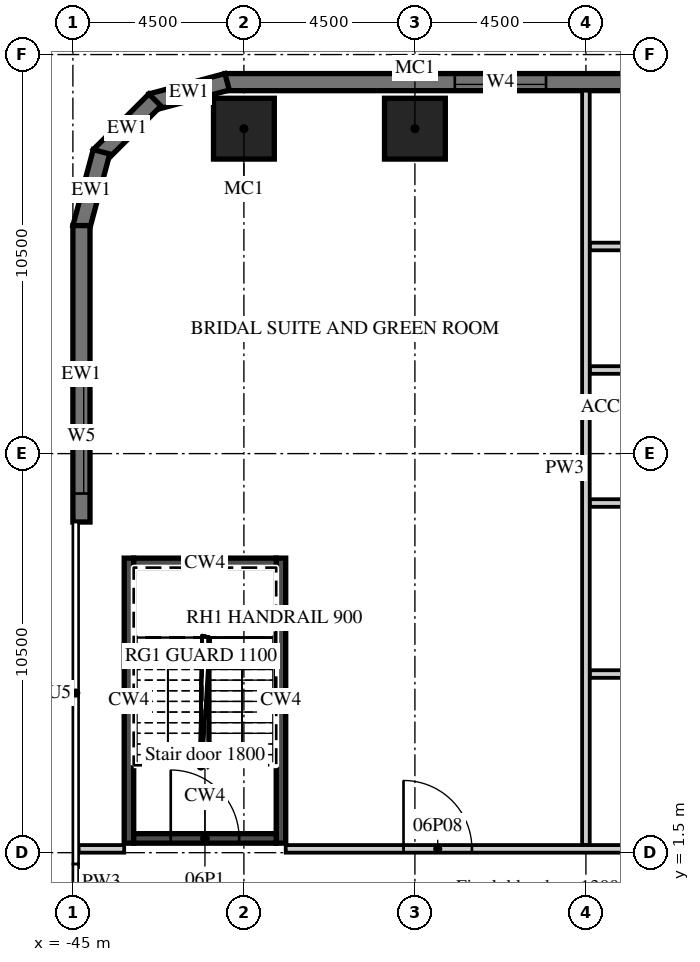
"""IFC4 building model, lengths in metres.
Left out: names, types, materials, properties, quantities, classifications, styles, units other than length and angle.
Written with IfcOpenShell. Run it as: python <this file> out.ifc"""

import sys

from ifc_helpers import new_model, si_unit, direction, frame, frame_2d, origin, origin_2d, place, context, subcontext, project, spatial, polyline, rectangle, outline, extrude, element, fill, save


model = new_model("IFC4")
c1 = context("Model", 3, precision=1e-05, world=origin(), true_north=direction((0.0, 1.0)))
c2 = subcontext(c1, "Body", "Model", "MODEL_VIEW")
j1 = project(units=[si_unit("LENGTHUNIT", "METRE"), si_unit("PLANEANGLEUNIT", "RADIAN")], contexts=[c1])
p1 = place(None, origin())
s1 = spatial("IfcSite", under=j1, at=p1, CompositionType="ELEMENT")
p2 = place(p1, origin())
s2 = spatial("IfcBuilding", under=s1, at=p2, CompositionType="ELEMENT")
p3 = place(p2, frame((0.0, 0.0, 38.0)))
s3 = spatial("IfcBuildingStorey", under=s2, at=p3, CompositionType="ELEMENT", Elevation=38.0)
for number, where, z_axis, x_axis in (
    (1, (-40.5, 20.55, 0.0), (0.0, 0.0, 1.0), (1.0, 0.0, 0.0)),
    (2, (-36.0, 20.55, 0.0), (0.0, 0.0, 1.0), (1.0, 0.0, 0.0)),
):
    element("IfcColumn", number, at=place(p3, frame(where, z_axis=z_axis, x_axis=x_axis)), inside=s3, PredefinedType="COLUMN", context=c2, shape_type="SweptSolid", body=[
        extrude(rectangle(XDim=1.6, YDim=1.6, at=origin_2d()), origin(), (0.0, 0.0, 1.0), 8.7),
    ])
p4 = place(p3, frame((13.5, 21.775, 0.0), z_axis=(0.0, 0.0, 1.0), x_axis=(-1.0, 0.0, 0.0)))
e3 = element("IfcWall", 3, at=p4, inside=s3, PredefinedType="SOLIDWALL", context=c2, shape_type="SweptSolid", body=[
    extrude(rectangle(XDim=54.5, YDim=0.45, at=frame_2d((27.25, 0.0))), origin(), (0.0, 0.0, 1.0), 8.7),
])
p5 = place(p4, frame((1.05, 0.0, 0.9)))
e4 = element("IfcOpeningElement", 4, at=p5, cuts=e3, PredefinedType="OPENING", context=c2, shape_type="SweptSolid", body=[
    extrude(rectangle(XDim=2.4, YDim=1.8, at=frame_2d((1.2, 0.9))), frame((0.0, 0.235, 0.0), z_axis=(0.0, -1.0, 0.0), x_axis=(1.0, 0.0, 0.0)), (0.0, 0.0, 1.0), 0.47),
])
p6 = place(p4, frame((5.55, 0.0, 0.9)))
e5 = element("IfcOpeningElement", 5, at=p6, cuts=e3, PredefinedType="OPENING", context=c2, shape_type="SweptSolid", body=[
    extrude(rectangle(XDim=2.4, YDim=1.8, at=frame_2d((1.2, 0.9))), frame((0.0, 0.235, 0.0), z_axis=(0.0, -1.0, 0.0), x_axis=(1.0, 0.0, 0.0)), (0.0, 0.0, 1.0), 0.47),
])
p7 = place(p4, frame((10.05, 0.0, 0.9)))
e6 = element("IfcOpeningElement", 6, at=p7, cuts=e3, PredefinedType="OPENING", context=c2, shape_type="SweptSolid", body=[
    extrude(rectangle(XDim=2.4, YDim=1.8, at=frame_2d((1.2, 0.9))), frame((0.0, 0.235, 0.0), z_axis=(0.0, -1.0, 0.0), x_axis=(1.0, 0.0, 0.0)), (0.0, 0.0, 1.0), 0.47),
])
p8 = place(p4, frame((14.55, 0.0, 0.9)))
e7 = element("IfcOpeningElement", 7, at=p8, cuts=e3, PredefinedType="OPENING", context=c2, shape_type="SweptSolid", body=[
    extrude(rectangle(XDim=2.4, YDim=1.8, at=frame_2d((1.2, 0.9))), frame((0.0, 0.235, 0.0), z_axis=(0.0, -1.0, 0.0), x_axis=(1.0, 0.0, 0.0)), (0.0, 0.0, 1.0), 0.47),
])
p9 = place(p4, frame((19.05, 0.0, 0.9)))
e8 = element("IfcOpeningElement", 8, at=p9, cuts=e3, PredefinedType="OPENING", context=c2, shape_type="SweptSolid", body=[
    extrude(rectangle(XDim=2.4, YDim=1.8, at=frame_2d((1.2, 0.9))), frame((0.0, 0.235, 0.0), z_axis=(0.0, -1.0, 0.0), x_axis=(1.0, 0.0, 0.0)), (0.0, 0.0, 1.0), 0.47),
])
p10 = place(p4, frame((23.55, 0.0, 0.9)))
e9 = element("IfcOpeningElement", 9, at=p10, cuts=e3, PredefinedType="OPENING", context=c2, shape_type="SweptSolid", body=[
    extrude(rectangle(XDim=2.4, YDim=1.8, at=frame_2d((1.2, 0.9))), frame((0.0, 0.235, 0.0), z_axis=(0.0, -1.0, 0.0), x_axis=(1.0, 0.0, 0.0)), (0.0, 0.0, 1.0), 0.47),
])
p11 = place(p4, frame((28.05, 0.0, 0.9)))
e10 = element("IfcOpeningElement", 10, at=p11, cuts=e3, PredefinedType="OPENING", context=c2, shape_type="SweptSolid", body=[
    extrude(rectangle(XDim=2.4, YDim=1.8, at=frame_2d((1.2, 0.9))), frame((0.0, 0.235, 0.0), z_axis=(0.0, -1.0, 0.0), x_axis=(1.0, 0.0, 0.0)), (0.0, 0.0, 1.0), 0.47),
])
p12 = place(p4, frame((32.55, 0.0, 0.9)))
e11 = element("IfcOpeningElement", 11, at=p12, cuts=e3, PredefinedType="OPENING", context=c2, shape_type="SweptSolid", body=[
    extrude(rectangle(XDim=2.4, YDim=1.8, at=frame_2d((1.2, 0.9))), frame((0.0, 0.235, 0.0), z_axis=(0.0, -1.0, 0.0), x_axis=(1.0, 0.0, 0.0)), (0.0, 0.0, 1.0), 0.47),
])
p13 = place(p4, frame((37.05, 0.0, 0.9)))
e12 = element("IfcOpeningElement", 12, at=p13, cuts=e3, PredefinedType="OPENING", context=c2, shape_type="SweptSolid", body=[
    extrude(rectangle(XDim=2.4, YDim=1.8, at=frame_2d((1.2, 0.9))), frame((0.0, 0.235, 0.0), z_axis=(0.0, -1.0, 0.0), x_axis=(1.0, 0.0, 0.0)), (0.0, 0.0, 1.0), 0.47),
])
p14 = place(p4, frame((41.55, 0.0, 0.9)))
e13 = element("IfcOpeningElement", 13, at=p14, cuts=e3, PredefinedType="OPENING", context=c2, shape_type="SweptSolid", body=[
    extrude(rectangle(XDim=2.4, YDim=1.8, at=frame_2d((1.2, 0.9))), frame((0.0, 0.235, 0.0), z_axis=(0.0, -1.0, 0.0), x_axis=(1.0, 0.0, 0.0)), (0.0, 0.0, 1.0), 0.47),
])
p15 = place(p4, frame((46.05, 0.0, 0.9)))
e14 = element("IfcOpeningElement", 14, at=p15, cuts=e3, PredefinedType="OPENING", context=c2, shape_type="SweptSolid", body=[
    extrude(rectangle(XDim=2.4, YDim=1.8, at=frame_2d((1.2, 0.9))), frame((0.0, 0.235, 0.0), z_axis=(0.0, -1.0, 0.0), x_axis=(1.0, 0.0, 0.0)), (0.0, 0.0, 1.0), 0.47),
])
p16 = place(p3, frame((-40.942, 21.783, 0.0), z_axis=(0.0, 0.0, 1.0), x_axis=(-0.965926999034, -0.25881466832, 0.0)))
e15 = element("IfcWall", 15, at=p16, inside=s3, PredefinedType="SOLIDWALL", context=c2, shape_type="SweptSolid", body=[
    extrude(outline(polyline([(0.0, -0.225), (2.071, -0.225), (1.95, 0.225), (0.121, 0.225), (0.0, -0.225)])), origin(), (0.0, 0.0, 1.0), 8.7),
])
p17 = place(p3, frame((-42.841, 21.305, 0.0), z_axis=(0.0, 0.0, 1.0), x_axis=(-0.707106781187, -0.707106781187, 0.0)))
e16 = element("IfcWall", 16, at=p17, inside=s3, PredefinedType="SOLIDWALL", context=c2, shape_type="SweptSolid", body=[
    extrude(outline(polyline([(0.0, -0.225), (2.071, -0.225), (1.95, 0.225), (0.121, 0.225), (0.0, -0.225)])), origin(), (0.0, 0.0, 1.0), 8.7),
])
p18 = place(p3, frame((-44.247, 19.942, 0.0), z_axis=(0.0, 0.0, 1.0), x_axis=(-0.25881466832, -0.965926999034, 0.0)))
e17 = element("IfcWall", 17, at=p18, inside=s3, PredefinedType="SOLIDWALL", context=c2, shape_type="SweptSolid", body=[
    extrude(outline(polyline([(-0.0, -0.225), (2.07, -0.225), (1.95, 0.225), (0.12, 0.225), (-0.0, -0.225)])), origin(), (0.0, 0.0, 1.0), 8.7),
])
p19 = place(p3, frame((-44.775, 18.0, 0.0), z_axis=(0.0, 0.0, 1.0), x_axis=(0.0, -1.0, 0.0)))
e18 = element("IfcWall", 18, at=p19, inside=s3, PredefinedType="SOLIDWALL", context=c2, shape_type="SweptSolid", body=[
    extrude(rectangle(XDim=7.8, YDim=0.45, at=frame_2d((3.9, 0.0))), origin(), (0.0, 0.0, 1.0), 8.7),
])
p20 = place(p19, frame((4.05, 0.0, 0.9)))
e19 = element("IfcOpeningElement", 19, at=p20, cuts=e18, PredefinedType="OPENING", context=c2, shape_type="SweptSolid", body=[
    extrude(rectangle(XDim=3.0, YDim=1.8, at=frame_2d((1.5, 0.9))), frame((0.0, 0.235, 0.0), z_axis=(0.0, -1.0, 0.0), x_axis=(1.0, 0.0, 0.0)), (0.0, 0.0, 1.0), 0.47),
])
for number, where, z_axis, x_axis in (
    (20, (-43.525, 1.75, 0.0), (0.0, 0.0, 1.0), (0.0, 1.0, 0.0)),
    (21, (-39.525, 1.75, 0.0), (0.0, 0.0, 1.0), (0.0, 1.0, 0.0)),
):
    element("IfcWall", number, at=place(p3, frame(where, z_axis=z_axis, x_axis=x_axis)), inside=s3, PredefinedType="SHEAR", context=c2, shape_type="SweptSolid", body=[
        extrude(rectangle(XDim=7.5, YDim=0.25, at=frame_2d((3.75, 0.0))), origin(), (0.0, 0.0, 1.0), 8.7),
    ])
p21 = place(p3, frame((-43.4, 9.125, 0.0), z_axis=(0.0, 0.0, 1.0), x_axis=(1.0, 0.0, 0.0)))
e22 = element("IfcWall", 22, at=p21, inside=s3, PredefinedType="SHEAR", context=c2, shape_type="SweptSolid", body=[
    extrude(rectangle(XDim=3.75, YDim=0.25, at=frame_2d((1.875, 0.0))), origin(), (0.0, 0.0, 1.0), 8.7),
])
p22 = place(p3, frame((-43.4, 1.875, 0.0), z_axis=(0.0, 0.0, 1.0), x_axis=(1.0, 0.0, 0.0)))
e23 = element("IfcWall", 23, at=p22, inside=s3, PredefinedType="SHEAR", context=c2, shape_type="SweptSolid", body=[
    extrude(rectangle(XDim=3.75, YDim=0.25, at=frame_2d((1.875, 0.0))), origin(), (0.0, 0.0, 1.0), 8.7),
])
p23 = place(p22, frame((0.975, 0.0, 0.0)))
e24 = element("IfcOpeningElement", 24, at=p23, cuts=e23, PredefinedType="OPENING", context=c2, shape_type="SweptSolid", body=[
    extrude(rectangle(XDim=1.8, YDim=2.1, at=frame_2d((0.9, 1.05))), frame((0.0, 0.135, 0.0), z_axis=(0.0, -1.0, 0.0), x_axis=(1.0, 0.0, 0.0)), (0.0, 0.0, 1.0), 0.27),
])
for number, where, z_axis, x_axis in (
    (25, (-31.4, 6.2, 0.0), (0.0, 0.0, 1.0), (1.0, 0.0, 0.0)),
    (26, (-31.4, 10.7, 0.0), (0.0, 0.0, 1.0), (1.0, 0.0, 0.0)),
    (27, (-31.4, 14.2, 0.0), (0.0, 0.0, 1.0), (1.0, 0.0, 0.0)),
):
    element("IfcWall", number, at=place(p3, frame(where, z_axis=z_axis, x_axis=x_axis)), inside=s3, PredefinedType="PARTITIONING", context=c2, shape_type="SweptSolid", body=[
        extrude(rectangle(XDim=5.05, YDim=0.2, at=frame_2d((2.525, 0.0))), origin(), (0.0, 0.0, 1.0), 8.7),
    ])
p24 = place(p3, frame((-31.4, 17.45, 0.0), z_axis=(0.0, 0.0, 1.0), x_axis=(1.0, 0.0, 0.0)))
e28 = element("IfcWall", 28, at=p24, inside=s3, PredefinedType="PARTITIONING", context=c2, shape_type="SweptSolid", body=[
    extrude(rectangle(XDim=8.8, YDim=0.2, at=frame_2d((4.4, 0.0))), origin(), (0.0, 0.0, 1.0), 8.7),
])
p25 = place(p24, frame((5.5, 0.0, 0.0)))
e29 = element("IfcOpeningElement", 29, at=p25, cuts=e28, PredefinedType="OPENING", context=c2, shape_type="SweptSolid", body=[
    extrude(rectangle(XDim=0.9, YDim=2.1, at=frame_2d((0.45, 1.05))), frame((0.0, 0.11, 0.0), z_axis=(0.0, -1.0, 0.0), x_axis=(1.0, 0.0, 0.0)), (0.0, 0.0, 1.0), 0.22),
])
p26 = place(p3, frame((-31.5, 1.7, 0.0), z_axis=(0.0, 0.0, 1.0), x_axis=(0.0, 1.0, 0.0)))
e30 = element("IfcWall", 30, at=p26, inside=s3, PredefinedType="PARTITIONING", context=c2, shape_type="SweptSolid", body=[
    extrude(rectangle(XDim=19.85, YDim=0.2, at=frame_2d((9.925, 0.0))), origin(), (0.0, 0.0, 1.0), 8.7),
])
p27 = place(p3, frame((-39.4, 1.6, 0.0), z_axis=(0.0, 0.0, 1.0), x_axis=(1.0, 0.0, 0.0)))
e31 = element("IfcWall", 31, at=p27, inside=s3, PredefinedType="PARTITIONING", context=c2, shape_type="SweptSolid", body=[
    extrude(rectangle(XDim=25.9, YDim=0.2, at=frame_2d((12.95, 0.0))), origin(), (0.0, 0.0, 1.0), 8.7),
])
p28 = place(p27, frame((20.55, 0.0, 0.0)))
e32 = element("IfcOpeningElement", 32, at=p28, cuts=e31, PredefinedType="OPENING", context=c2, shape_type="SweptSolid", body=[
    extrude(rectangle(XDim=1.8, YDim=2.1, at=frame_2d((0.9, 1.05))), frame((0.0, 0.11, 0.0), z_axis=(0.0, -1.0, 0.0), x_axis=(1.0, 0.0, 0.0)), (0.0, 0.0, 1.0), 0.22),
])
p29 = place(p27, frame((14.375, 0.0, 0.0)))
e33 = element("IfcOpeningElement", 33, at=p29, cuts=e31, PredefinedType="OPENING", context=c2, shape_type="SweptSolid", body=[
    extrude(rectangle(XDim=1.2, YDim=2.1, at=frame_2d((0.6, 1.05))), frame((0.0, 0.11, 0.0), z_axis=(0.0, -1.0, 0.0), x_axis=(1.0, 0.0, 0.0)), (0.0, 0.0, 1.0), 0.22),
])
p30 = place(p27, frame((3.1, 0.0, 0.0)))
e34 = element("IfcOpeningElement", 34, at=p30, cuts=e31, PredefinedType="OPENING", context=c2, shape_type="SweptSolid", body=[
    extrude(rectangle(XDim=1.8, YDim=2.1, at=frame_2d((0.9, 1.05))), frame((0.0, 0.11, 0.0), z_axis=(0.0, -1.0, 0.0), x_axis=(1.0, 0.0, 0.0)), (0.0, 0.0, 1.0), 0.22),
])
p31 = place(p3, frame((-44.85, 1.6, 0.0), z_axis=(0.0, 0.0, 1.0), x_axis=(1.0, 0.0, 0.0)))
e35 = element("IfcWall", 35, at=p31, inside=s3, PredefinedType="PARTITIONING", context=c2, shape_type="SweptSolid", body=[
    extrude(rectangle(XDim=1.2, YDim=0.2, at=frame_2d((0.6, 0.0))), origin(), (0.0, 0.0, 1.0), 8.7),
])
p32 = place(p15, origin())
e36 = element("IfcWindow", 36, at=p32, inside=s3, PartitioningType="SINGLE_PANEL", PredefinedType="WINDOW", context=c2, shape_type="SweptSolid", body=[
    extrude(rectangle(XDim=2.4, YDim=1.8, at=frame_2d((1.2, 0.9))), frame((0.0, 0.09, 0.0), z_axis=(0.0, -1.0, 0.0), x_axis=(1.0, 0.0, 0.0)), (0.0, 0.0, 1.0), 0.06),
])
fill(e14, e36)
p33 = place(p20, origin())
e37 = element("IfcWindow", 37, at=p33, inside=s3, PartitioningType="SINGLE_PANEL", PredefinedType="WINDOW", context=c2, shape_type="SweptSolid", body=[
    extrude(rectangle(XDim=3.0, YDim=1.8, at=frame_2d((1.5, 0.9))), frame((0.0, 0.09, 0.0), z_axis=(0.0, -1.0, 0.0), x_axis=(1.0, 0.0, 0.0)), (0.0, 0.0, 1.0), 0.06),
])
fill(e19, e37)
p34 = place(p23, origin())
e38 = element("IfcDoor", 38, at=p34, inside=s3, OperationType="DOUBLE_DOOR_DOUBLE_SWING", PredefinedType="DOOR", context=c2, shape_type="SweptSolid", body=[
    extrude(rectangle(XDim=1.8, YDim=2.1, at=frame_2d((0.9, 1.05))), frame((0.0, 0.025, 0.0), z_axis=(0.0, -1.0, 0.0), x_axis=(1.0, 0.0, 0.0)), (0.0, 0.0, 1.0), 0.05),
])
fill(e24, e38)
p35 = place(p30, origin())
e39 = element("IfcDoor", 39, at=p35, inside=s3, OperationType="DOUBLE_DOOR_DOUBLE_SWING", PredefinedType="DOOR", context=c2, shape_type="SweptSolid", body=[
    extrude(rectangle(XDim=1.8, YDim=2.1, at=frame_2d((0.9, 1.05))), frame((0.0, 0.025, 0.0), z_axis=(0.0, -1.0, 0.0), x_axis=(1.0, 0.0, 0.0)), (0.0, 0.0, 1.0), 0.05),
])
fill(e34, e39)
save(model, sys.argv[1])
